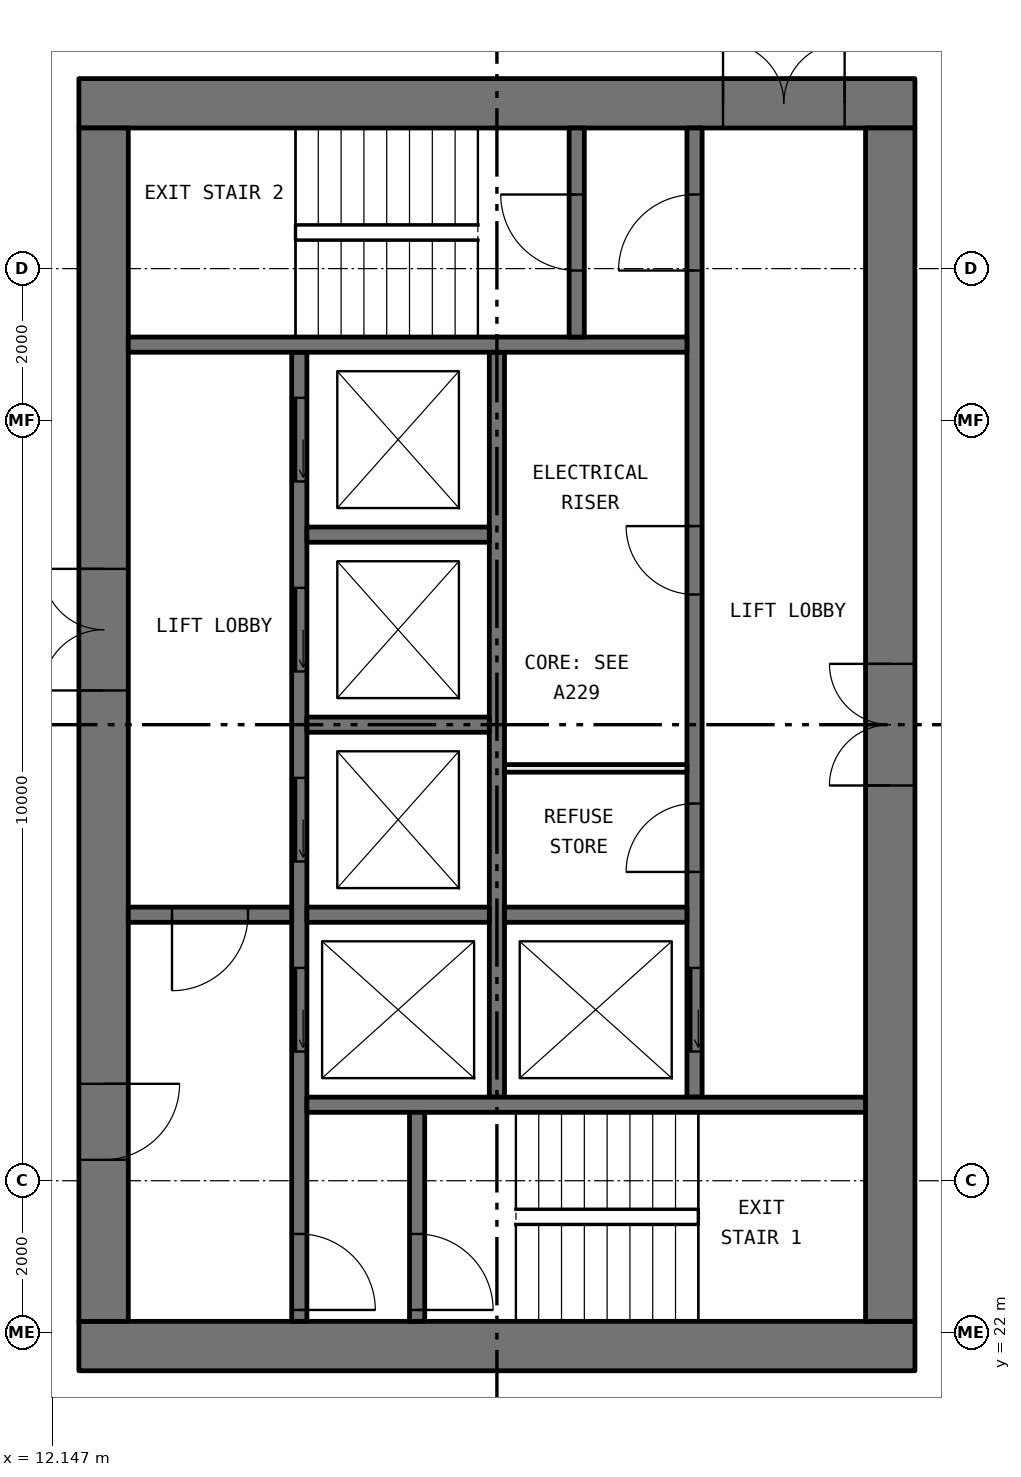
"""IFC4 building model, lengths in metres.
Left out: names, types, materials, properties, quantities, classifications, styles, units other than length and angle.
Written with IfcOpenShell. Run it as: python <this file> out.ifc"""

import sys

from ifc_helpers import new_model, si_unit, direction, frame, frame_2d, origin, place, context, subcontext, project, spatial, rectangle, extrude, element, fill, save


model = new_model("IFC4")
c1 = context("Model", 3, precision=1e-05, world=origin(), true_north=direction((0.0, 1.0)))
c2 = subcontext(c1, "Body", "Model", "MODEL_VIEW")
j1 = project(units=[si_unit("LENGTHUNIT", "METRE"), si_unit("PLANEANGLEUNIT", "RADIAN")], contexts=[c1])
p1 = place(None, origin())
s1 = spatial("IfcSite", under=j1, at=p1, CompositionType="ELEMENT")
p2 = place(p1, origin())
s2 = spatial("IfcBuilding", under=s1, at=p2, CompositionType="ELEMENT")
p3 = place(p2, frame((0.0, 0.0, 110.4)))
s3 = spatial("IfcBuildingStorey", under=s2, at=p3, CompositionType="ELEMENT", Elevation=110.4)
p4 = place(p3, frame((12.5, 21.825, 0.0), z_axis=(0.0, 0.0, 1.0), x_axis=(1.0, 0.0, 0.0)))
e1 = element("IfcWall", 1, at=p4, inside=s3, PredefinedType="SHEAR", context=c2, shape_type="SweptSolid", body=[
    extrude(rectangle(XDim=11.0, YDim=0.65, at=frame_2d((5.5, 0.0))), origin(), (0.0, 0.0, 1.0), 3.05),
])
p5 = place(p3, frame((12.5, 38.175, 0.0), z_axis=(0.0, 0.0, 1.0), x_axis=(1.0, 0.0, 0.0)))
e2 = element("IfcWall", 2, at=p5, inside=s3, PredefinedType="SHEAR", context=c2, shape_type="SweptSolid", body=[
    extrude(rectangle(XDim=11.0, YDim=0.65, at=frame_2d((5.5, 0.0))), origin(), (0.0, 0.0, 1.0), 3.05),
])
p6 = place(p5, frame((8.475, 0.0, 0.0)))
e3 = element("IfcOpeningElement", 3, at=p6, cuts=e2, PredefinedType="OPENING", context=c2, shape_type="SweptSolid", body=[
    extrude(rectangle(XDim=1.6, YDim=2.1, at=frame_2d((0.8, 1.05))), frame((0.0, 0.335, 0.0), z_axis=(0.0, -1.0, 0.0), x_axis=(1.0, 0.0, 0.0)), (0.0, 0.0, 1.0), 0.67),
])
p7 = place(p3, frame((12.825, 22.15, 0.0), z_axis=(0.0, 0.0, 1.0), x_axis=(0.0, 1.0, 0.0)))
e4 = element("IfcWall", 4, at=p7, inside=s3, PredefinedType="SHEAR", context=c2, shape_type="SweptSolid", body=[
    extrude(rectangle(XDim=15.7, YDim=0.65, at=frame_2d((7.85, 0.0))), origin(), (0.0, 0.0, 1.0), 3.05),
])
p8 = place(p7, frame((8.3, 0.0, 0.0)))
e5 = element("IfcOpeningElement", 5, at=p8, cuts=e4, PredefinedType="OPENING", context=c2, shape_type="SweptSolid", body=[
    extrude(rectangle(XDim=1.6, YDim=2.1, at=frame_2d((0.8, 1.05))), frame((0.0, 0.335, 0.0), z_axis=(0.0, -1.0, 0.0), x_axis=(1.0, 0.0, 0.0)), (0.0, 0.0, 1.0), 0.67),
])
p9 = place(p7, frame((2.125, 0.0, 0.0)))
e6 = element("IfcOpeningElement", 6, at=p9, cuts=e4, PredefinedType="OPENING", context=c2, shape_type="SweptSolid", body=[
    extrude(rectangle(XDim=1.0, YDim=2.1, at=frame_2d((0.5, 1.05))), frame((0.0, 0.335, 0.0), z_axis=(0.0, -1.0, 0.0), x_axis=(1.0, 0.0, 0.0)), (0.0, 0.0, 1.0), 0.67),
])
p10 = place(p3, frame((23.175, 22.15, 0.0), z_axis=(0.0, 0.0, 1.0), x_axis=(0.0, 1.0, 0.0)))
e7 = element("IfcWall", 7, at=p10, inside=s3, PredefinedType="SHEAR", context=c2, shape_type="SweptSolid", body=[
    extrude(rectangle(XDim=15.7, YDim=0.65, at=frame_2d((7.85, 0.0))), origin(), (0.0, 0.0, 1.0), 3.05),
])
p11 = place(p10, frame((7.05, 0.0, 0.0)))
e8 = element("IfcOpeningElement", 8, at=p11, cuts=e7, PredefinedType="OPENING", context=c2, shape_type="SweptSolid", body=[
    extrude(rectangle(XDim=1.6, YDim=2.1, at=frame_2d((0.8, 1.05))), frame((0.0, 0.335, 0.0), z_axis=(0.0, -1.0, 0.0), x_axis=(1.0, 0.0, 0.0)), (0.0, 0.0, 1.0), 0.67),
])
p12 = place(p3, frame((15.4, 22.15, 0.0), z_axis=(0.0, 0.0, 1.0), x_axis=(0.0, 1.0, 0.0)))
e9 = element("IfcWall", 9, at=p12, inside=s3, PredefinedType="SOLIDWALL", context=c2, shape_type="SweptSolid", body=[
    extrude(rectangle(XDim=12.75, YDim=0.2, at=frame_2d((6.375, 0.0))), origin(), (0.0, 0.0, 1.0), 3.05),
])
p13 = place(p12, frame((3.55, 0.0, 0.0)))
e10 = element("IfcOpeningElement", 10, at=p13, cuts=e9, PredefinedType="OPENING", context=c2, shape_type="SweptSolid", body=[
    extrude(rectangle(XDim=1.1, YDim=2.1, at=frame_2d((0.55, 1.05))), frame((0.0, 0.11, 0.0), z_axis=(0.0, -1.0, 0.0), x_axis=(1.0, 0.0, 0.0)), (0.0, 0.0, 1.0), 0.22),
])
p14 = place(p12, frame((6.05, 0.0, 0.0)))
e11 = element("IfcOpeningElement", 11, at=p14, cuts=e9, PredefinedType="OPENING", context=c2, shape_type="SweptSolid", body=[
    extrude(rectangle(XDim=1.1, YDim=2.1, at=frame_2d((0.55, 1.05))), frame((0.0, 0.11, 0.0), z_axis=(0.0, -1.0, 0.0), x_axis=(1.0, 0.0, 0.0)), (0.0, 0.0, 1.0), 0.22),
])
p15 = place(p12, frame((8.55, 0.0, 0.0)))
e12 = element("IfcOpeningElement", 12, at=p15, cuts=e9, PredefinedType="OPENING", context=c2, shape_type="SweptSolid", body=[
    extrude(rectangle(XDim=1.1, YDim=2.1, at=frame_2d((0.55, 1.05))), frame((0.0, 0.11, 0.0), z_axis=(0.0, -1.0, 0.0), x_axis=(1.0, 0.0, 0.0)), (0.0, 0.0, 1.0), 0.22),
])
p16 = place(p12, frame((11.05, 0.0, 0.0)))
e13 = element("IfcOpeningElement", 13, at=p16, cuts=e9, PredefinedType="OPENING", context=c2, shape_type="SweptSolid", body=[
    extrude(rectangle(XDim=1.1, YDim=2.1, at=frame_2d((0.55, 1.05))), frame((0.0, 0.11, 0.0), z_axis=(0.0, -1.0, 0.0), x_axis=(1.0, 0.0, 0.0)), (0.0, 0.0, 1.0), 0.22),
])
p17 = place(p12, frame((0.15, 0.0, 0.0)))
e14 = element("IfcOpeningElement", 14, at=p17, cuts=e9, PredefinedType="OPENING", context=c2, shape_type="SweptSolid", body=[
    extrude(rectangle(XDim=1.0, YDim=2.1, at=frame_2d((0.5, 1.05))), frame((0.0, 0.11, 0.0), z_axis=(0.0, -1.0, 0.0), x_axis=(1.0, 0.0, 0.0)), (0.0, 0.0, 1.0), 0.22),
])
p18 = place(p3, frame((20.6, 25.1, 0.0), z_axis=(0.0, 0.0, 1.0), x_axis=(0.0, 1.0, 0.0)))
e15 = element("IfcWall", 15, at=p18, inside=s3, PredefinedType="SOLIDWALL", context=c2, shape_type="SweptSolid", body=[
    extrude(rectangle(XDim=12.75, YDim=0.2, at=frame_2d((6.375, 0.0))), origin(), (0.0, 0.0, 1.0), 3.05),
])
p19 = place(p18, frame((0.6, 0.0, 0.0)))
e16 = element("IfcOpeningElement", 16, at=p19, cuts=e15, PredefinedType="OPENING", context=c2, shape_type="SweptSolid", body=[
    extrude(rectangle(XDim=1.1, YDim=2.1, at=frame_2d((0.55, 1.05))), frame((0.0, 0.11, 0.0), z_axis=(0.0, -1.0, 0.0), x_axis=(1.0, 0.0, 0.0)), (0.0, 0.0, 1.0), 0.22),
])
p20 = place(p18, frame((10.875, 0.0, 0.0)))
e17 = element("IfcOpeningElement", 17, at=p20, cuts=e15, PredefinedType="OPENING", context=c2, shape_type="SweptSolid", body=[
    extrude(rectangle(XDim=1.0, YDim=2.1, at=frame_2d((0.5, 1.05))), frame((0.0, 0.11, 0.0), z_axis=(0.0, -1.0, 0.0), x_axis=(1.0, 0.0, 0.0)), (0.0, 0.0, 1.0), 0.22),
])
p21 = place(p18, frame((2.962, 0.0, 0.0)))
e18 = element("IfcOpeningElement", 18, at=p21, cuts=e15, PredefinedType="OPENING", context=c2, shape_type="SweptSolid", body=[
    extrude(rectangle(XDim=0.9, YDim=2.1, at=frame_2d((0.45, 1.05))), frame((0.0, 0.11, 0.0), z_axis=(0.0, -1.0, 0.0), x_axis=(1.0, 0.0, 0.0)), (0.0, 0.0, 1.0), 0.22),
])
p22 = place(p18, frame((6.613, 0.0, 0.0)))
e19 = element("IfcOpeningElement", 19, at=p22, cuts=e15, PredefinedType="OPENING", context=c2, shape_type="SweptSolid", body=[
    extrude(rectangle(XDim=0.9, YDim=2.1, at=frame_2d((0.45, 1.05))), frame((0.0, 0.11, 0.0), z_axis=(0.0, -1.0, 0.0), x_axis=(1.0, 0.0, 0.0)), (0.0, 0.0, 1.0), 0.22),
])
p23 = place(p3, frame((18.0, 25.1, 0.0), z_axis=(0.0, 0.0, 1.0), x_axis=(0.0, 1.0, 0.0)))
e20 = element("IfcWall", 20, at=p23, inside=s3, PredefinedType="SOLIDWALL", context=c2, shape_type="SweptSolid", body=[
    extrude(rectangle(XDim=9.8, YDim=0.2, at=frame_2d((4.9, 0.0))), origin(), (0.0, 0.0, 1.0), 3.05),
])
for number, where, z_axis, x_axis in (
    (21, (15.5, 25.0, 0.0), (0.0, 0.0, 1.0), (1.0, 0.0, 0.0)),
    (22, (13.15, 35.0, 0.0), (0.0, 0.0, 1.0), (1.0, 0.0, 0.0)),
):
    element("IfcWall", number, at=place(p3, frame(where, z_axis=z_axis, x_axis=x_axis)), inside=s3, PredefinedType="SOLIDWALL", context=c2, shape_type="SweptSolid", body=[
        extrude(rectangle(XDim=7.35, YDim=0.2, at=frame_2d((3.675, 0.0))), origin(), (0.0, 0.0, 1.0), 3.05),
    ])
p24 = place(p3, frame((13.15, 27.5, 0.0), z_axis=(0.0, 0.0, 1.0), x_axis=(1.0, 0.0, 0.0)))
e23 = element("IfcWall", 23, at=p24, inside=s3, PredefinedType="SOLIDWALL", context=c2, shape_type="SweptSolid", body=[
    extrude(rectangle(XDim=2.15, YDim=0.2, at=frame_2d((1.075, 0.0))), origin(), (0.0, 0.0, 1.0), 3.05),
])
p25 = place(p24, frame((0.575, 0.0, 0.0)))
e24 = element("IfcOpeningElement", 24, at=p25, cuts=e23, PredefinedType="OPENING", context=c2, shape_type="SweptSolid", body=[
    extrude(rectangle(XDim=1.0, YDim=2.1, at=frame_2d((0.5, 1.05))), frame((0.0, 0.11, 0.0), z_axis=(0.0, -1.0, 0.0), x_axis=(1.0, 0.0, 0.0)), (0.0, 0.0, 1.0), 0.22),
])
p26 = place(p3, frame((16.95, 22.15, 0.0), z_axis=(0.0, 0.0, 1.0), x_axis=(0.0, 1.0, 0.0)))
e25 = element("IfcWall", 25, at=p26, inside=s3, PredefinedType="SOLIDWALL", context=c2, shape_type="SweptSolid", body=[
    extrude(rectangle(XDim=2.75, YDim=0.2, at=frame_2d((1.375, 0.0))), origin(), (0.0, 0.0, 1.0), 3.05),
])
p27 = place(p26, frame((0.15, 0.0, 0.0)))
e26 = element("IfcOpeningElement", 26, at=p27, cuts=e25, PredefinedType="OPENING", context=c2, shape_type="SweptSolid", body=[
    extrude(rectangle(XDim=1.0, YDim=2.1, at=frame_2d((0.5, 1.05))), frame((0.0, 0.11, 0.0), z_axis=(0.0, -1.0, 0.0), x_axis=(1.0, 0.0, 0.0)), (0.0, 0.0, 1.0), 0.22),
])
p28 = place(p3, frame((19.05, 35.1, 0.0), z_axis=(0.0, 0.0, 1.0), x_axis=(0.0, 1.0, 0.0)))
e27 = element("IfcWall", 27, at=p28, inside=s3, PredefinedType="SOLIDWALL", context=c2, shape_type="SweptSolid", body=[
    extrude(rectangle(XDim=2.75, YDim=0.2, at=frame_2d((1.375, 0.0))), origin(), (0.0, 0.0, 1.0), 3.05),
])
p29 = place(p28, frame((0.875, 0.0, 0.0)))
e28 = element("IfcOpeningElement", 28, at=p29, cuts=e27, PredefinedType="OPENING", context=c2, shape_type="SweptSolid", body=[
    extrude(rectangle(XDim=1.0, YDim=2.1, at=frame_2d((0.5, 1.05))), frame((0.0, 0.11, 0.0), z_axis=(0.0, -1.0, 0.0), x_axis=(1.0, 0.0, 0.0)), (0.0, 0.0, 1.0), 0.22),
])
for number, where, z_axis, x_axis in (
    (29, (15.5, 27.5, 0.0), (0.0, 0.0, 1.0), (1.0, 0.0, 0.0)),
    (30, (15.5, 30.0, 0.0), (0.0, 0.0, 1.0), (1.0, 0.0, 0.0)),
    (31, (15.5, 32.5, 0.0), (0.0, 0.0, 1.0), (1.0, 0.0, 0.0)),
    (32, (18.1, 27.5, 0.0), (0.0, 0.0, 1.0), (1.0, 0.0, 0.0)),
):
    element("IfcWall", number, at=place(p3, frame(where, z_axis=z_axis, x_axis=x_axis)), inside=s3, PredefinedType="SOLIDWALL", context=c2, shape_type="SweptSolid", body=[
        extrude(rectangle(XDim=2.4, YDim=0.2, at=frame_2d((1.2, 0.0))), origin(), (0.0, 0.0, 1.0), 3.05),
    ])
p30 = place(p3, frame((18.1, 29.425, 0.0), z_axis=(0.0, 0.0, 1.0), x_axis=(1.0, 0.0, 0.0)))
e33 = element("IfcWall", 33, at=p30, inside=s3, PredefinedType="PARTITIONING", context=c2, shape_type="SweptSolid", body=[
    extrude(rectangle(XDim=2.4, YDim=0.1, at=frame_2d((1.2, 0.0))), origin(), (0.0, 0.0, 1.0), 3.05),
])
p31 = place(p19, origin())
e34 = element("IfcDoor", 34, at=p31, inside=s3, OperationType="SLIDING_TO_LEFT", PredefinedType="DOOR", context=c2, shape_type="SweptSolid", body=[
    extrude(rectangle(XDim=1.1, YDim=2.1, at=frame_2d((0.55, 1.05))), frame((0.0, 0.025, 0.0), z_axis=(0.0, -1.0, 0.0), x_axis=(1.0, 0.0, 0.0)), (0.0, 0.0, 1.0), 0.05),
])
fill(e16, e34)
p32 = place(p13, origin())
e35 = element("IfcDoor", 35, at=p32, inside=s3, OperationType="SLIDING_TO_LEFT", PredefinedType="DOOR", context=c2, shape_type="SweptSolid", body=[
    extrude(rectangle(XDim=1.1, YDim=2.1, at=frame_2d((0.55, 1.05))), frame((0.0, 0.025, 0.0), z_axis=(0.0, -1.0, 0.0), x_axis=(1.0, 0.0, 0.0)), (0.0, 0.0, 1.0), 0.05),
])
fill(e10, e35)
p33 = place(p14, origin())
e36 = element("IfcDoor", 36, at=p33, inside=s3, OperationType="SLIDING_TO_LEFT", PredefinedType="DOOR", context=c2, shape_type="SweptSolid", body=[
    extrude(rectangle(XDim=1.1, YDim=2.1, at=frame_2d((0.55, 1.05))), frame((0.0, 0.025, 0.0), z_axis=(0.0, -1.0, 0.0), x_axis=(1.0, 0.0, 0.0)), (0.0, 0.0, 1.0), 0.05),
])
fill(e11, e36)
p34 = place(p15, origin())
e37 = element("IfcDoor", 37, at=p34, inside=s3, OperationType="SLIDING_TO_LEFT", PredefinedType="DOOR", context=c2, shape_type="SweptSolid", body=[
    extrude(rectangle(XDim=1.1, YDim=2.1, at=frame_2d((0.55, 1.05))), frame((0.0, 0.025, 0.0), z_axis=(0.0, -1.0, 0.0), x_axis=(1.0, 0.0, 0.0)), (0.0, 0.0, 1.0), 0.05),
])
fill(e12, e37)
p35 = place(p16, origin())
e38 = element("IfcDoor", 38, at=p35, inside=s3, OperationType="SLIDING_TO_LEFT", PredefinedType="DOOR", context=c2, shape_type="SweptSolid", body=[
    extrude(rectangle(XDim=1.1, YDim=2.1, at=frame_2d((0.55, 1.05))), frame((0.0, 0.025, 0.0), z_axis=(0.0, -1.0, 0.0), x_axis=(1.0, 0.0, 0.0)), (0.0, 0.0, 1.0), 0.05),
])
fill(e13, e38)
p36 = place(p27, frame((1.0, 0.0, 0.0), x_axis=(-1.0, 0.0, 0.0)))
e39 = element("IfcDoor", 39, at=p36, inside=s3, OperationType="SINGLE_SWING_LEFT", PredefinedType="DOOR", context=c2, shape_type="SweptSolid", body=[
    extrude(rectangle(XDim=1.0, YDim=2.1, at=frame_2d((0.5, 1.05))), frame((0.0, 0.025, 0.0), z_axis=(0.0, -1.0, 0.0), x_axis=(1.0, 0.0, 0.0)), (0.0, 0.0, 1.0), 0.05),
])
fill(e26, e39)
p37 = place(p17, frame((1.0, 0.0, 0.0), x_axis=(-1.0, 0.0, 0.0)))
e40 = element("IfcDoor", 40, at=p37, inside=s3, OperationType="SINGLE_SWING_LEFT", PredefinedType="DOOR", context=c2, shape_type="SweptSolid", body=[
    extrude(rectangle(XDim=1.0, YDim=2.1, at=frame_2d((0.5, 1.05))), frame((0.0, 0.025, 0.0), z_axis=(0.0, -1.0, 0.0), x_axis=(1.0, 0.0, 0.0)), (0.0, 0.0, 1.0), 0.05),
])
fill(e14, e40)
p38 = place(p20, origin())
e41 = element("IfcDoor", 41, at=p38, inside=s3, OperationType="SINGLE_SWING_RIGHT", PredefinedType="DOOR", context=c2, shape_type="SweptSolid", body=[
    extrude(rectangle(XDim=1.0, YDim=2.1, at=frame_2d((0.5, 1.05))), frame((0.0, 0.025, 0.0), z_axis=(0.0, -1.0, 0.0), x_axis=(1.0, 0.0, 0.0)), (0.0, 0.0, 1.0), 0.05),
])
fill(e17, e41)
p39 = place(p29, origin())
e42 = element("IfcDoor", 42, at=p39, inside=s3, OperationType="SINGLE_SWING_LEFT", PredefinedType="DOOR", context=c2, shape_type="SweptSolid", body=[
    extrude(rectangle(XDim=1.0, YDim=2.1, at=frame_2d((0.5, 1.05))), frame((0.0, 0.025, 0.0), z_axis=(0.0, -1.0, 0.0), x_axis=(1.0, 0.0, 0.0)), (0.0, 0.0, 1.0), 0.05),
])
fill(e28, e42)
p40 = place(p25, frame((1.0, 0.0, 0.0), x_axis=(-1.0, 0.0, 0.0)))
e43 = element("IfcDoor", 43, at=p40, inside=s3, OperationType="SINGLE_SWING_LEFT", PredefinedType="DOOR", context=c2, shape_type="SweptSolid", body=[
    extrude(rectangle(XDim=1.0, YDim=2.1, at=frame_2d((0.5, 1.05))), frame((0.0, 0.025, 0.0), z_axis=(0.0, -1.0, 0.0), x_axis=(1.0, 0.0, 0.0)), (0.0, 0.0, 1.0), 0.05),
])
fill(e24, e43)
p41 = place(p8, origin())
e44 = element("IfcDoor", 44, at=p41, inside=s3, OperationType="DOUBLE_DOOR_SINGLE_SWING", PredefinedType="DOOR", context=c2, shape_type="SweptSolid", body=[
    extrude(rectangle(XDim=1.6, YDim=2.1, at=frame_2d((0.8, 1.05))), frame((0.0, 0.025, 0.0), z_axis=(0.0, -1.0, 0.0), x_axis=(1.0, 0.0, 0.0)), (0.0, 0.0, 1.0), 0.05),
])
fill(e5, e44)
p42 = place(p9, frame((1.0, 0.0, 0.0), x_axis=(-1.0, 0.0, 0.0)))
e45 = element("IfcDoor", 45, at=p42, inside=s3, OperationType="SINGLE_SWING_RIGHT", PredefinedType="DOOR", context=c2, shape_type="SweptSolid", body=[
    extrude(rectangle(XDim=1.0, YDim=2.1, at=frame_2d((0.5, 1.05))), frame((0.0, 0.025, 0.0), z_axis=(0.0, -1.0, 0.0), x_axis=(1.0, 0.0, 0.0)), (0.0, 0.0, 1.0), 0.05),
])
fill(e6, e45)
p43 = place(p6, origin())
e46 = element("IfcDoor", 46, at=p43, inside=s3, OperationType="DOUBLE_DOOR_SINGLE_SWING", PredefinedType="DOOR", context=c2, shape_type="SweptSolid", body=[
    extrude(rectangle(XDim=1.6, YDim=2.1, at=frame_2d((0.8, 1.05))), frame((0.0, 0.025, 0.0), z_axis=(0.0, -1.0, 0.0), x_axis=(1.0, 0.0, 0.0)), (0.0, 0.0, 1.0), 0.05),
])
fill(e3, e46)
p44 = place(p11, origin())
e47 = element("IfcDoor", 47, at=p44, inside=s3, OperationType="DOUBLE_DOOR_SINGLE_SWING", PredefinedType="DOOR", context=c2, shape_type="SweptSolid", body=[
    extrude(rectangle(XDim=1.6, YDim=2.1, at=frame_2d((0.8, 1.05))), frame((0.0, 0.025, 0.0), z_axis=(0.0, -1.0, 0.0), x_axis=(1.0, 0.0, 0.0)), (0.0, 0.0, 1.0), 0.05),
])
fill(e8, e47)
p45 = place(p21, origin())
e48 = element("IfcDoor", 48, at=p45, inside=s3, OperationType="SINGLE_SWING_RIGHT", PredefinedType="DOOR", context=c2, shape_type="SweptSolid", body=[
    extrude(rectangle(XDim=0.9, YDim=2.1, at=frame_2d((0.45, 1.05))), frame((0.0, 0.025, 0.0), z_axis=(0.0, -1.0, 0.0), x_axis=(1.0, 0.0, 0.0)), (0.0, 0.0, 1.0), 0.05),
])
fill(e18, e48)
p46 = place(p22, origin())
e49 = element("IfcDoor", 49, at=p46, inside=s3, OperationType="SINGLE_SWING_LEFT", PredefinedType="DOOR", context=c2, shape_type="SweptSolid", body=[
    extrude(rectangle(XDim=0.9, YDim=2.1, at=frame_2d((0.45, 1.05))), frame((0.0, 0.025, 0.0), z_axis=(0.0, -1.0, 0.0), x_axis=(1.0, 0.0, 0.0)), (0.0, 0.0, 1.0), 0.05),
])
fill(e19, e49)
save(model, sys.argv[1])
